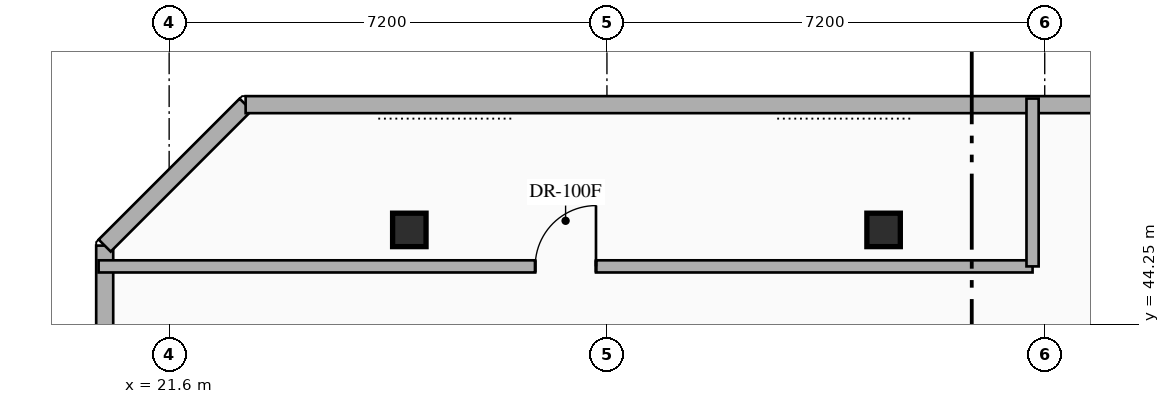
"""IFC4 building model, lengths in metres.
Left out: names, types, materials, properties, quantities, classifications, styles, units other than length and angle.
Written with IfcOpenShell. Run it as: python <this file> out.ifc"""

import sys

from ifc_helpers import new_model, si_unit, direction, frame, frame_2d, origin, origin_2d, place, context, subcontext, project, spatial, rectangle, hollow_rectangle, extrude, element, fill, save


model = new_model("IFC4")
c1 = context("Model", 3, precision=1e-05, world=origin(), true_north=direction((0.0, 1.0)))
c2 = subcontext(c1, "Body", "Model", "MODEL_VIEW")
j1 = project(units=[si_unit("LENGTHUNIT", "METRE"), si_unit("PLANEANGLEUNIT", "RADIAN")], contexts=[c1])
p1 = place(None, origin())
s1 = spatial("IfcSite", under=j1, at=p1, CompositionType="ELEMENT")
p2 = place(p1, origin())
s2 = spatial("IfcBuilding", under=s1, at=p2, CompositionType="ELEMENT")
p3 = place(p2, frame((0.0, 0.0, 289.95)))
s3 = spatial("IfcBuildingStorey", under=s2, at=p3, CompositionType="ELEMENT", Elevation=289.95)
for number, where, z_axis, x_axis in (
    (1, (25.55, 45.8, 0.0), (0.0, 0.0, 1.0), (1.0, 0.0, 0.0)),
    (2, (33.35, 45.8, 0.0), (0.0, 0.0, 1.0), (1.0, 0.0, 0.0)),
):
    element("IfcColumn", number, at=place(p3, frame(where, z_axis=z_axis, x_axis=x_axis)), inside=s3, PredefinedType="COLUMN", context=c2, shape_type="SweptSolid", body=[
        extrude(hollow_rectangle(XDim=0.55, YDim=0.55, WallThickness=0.022, at=origin_2d()), origin(), (0.0, 0.0, 1.0), 3.818),
    ])
p4 = place(p3, frame((20.54, 23.54, 0.0), z_axis=(0.0, 0.0, 1.0), x_axis=(0.0, 1.0, 0.0)))
e3 = element("IfcWall", 3, at=p4, inside=s3, PredefinedType="STANDARD", context=c2, shape_type="SweptSolid", body=[
    extrude(rectangle(XDim=22.002, YDim=0.28, at=frame_2d((11.001, 0.0))), origin(), (0.0, 0.0, 1.0), 3.85),
])
p5 = place(p3, frame((20.54, 45.542, 0.0), z_axis=(0.0, 0.0, 1.0), x_axis=(0.707069542501, 0.707144017911, 0.0)))
e4 = element("IfcWall", 4, at=p5, inside=s3, PredefinedType="STANDARD", context=c2, shape_type="SweptSolid", body=[
    extrude(rectangle(XDim=3.278, YDim=0.28, at=frame_2d((1.639, 0.0))), origin(), (0.0, 0.0, 1.0), 3.85),
])
p6 = place(p3, frame((22.858, 47.86, 0.0), z_axis=(0.0, 0.0, 1.0), x_axis=(1.0, 0.0, 0.0)))
e5 = element("IfcWall", 5, at=p6, inside=s3, PredefinedType="STANDARD", context=c2, shape_type="SweptSolid", body=[
    extrude(rectangle(XDim=19.684, YDim=0.28, at=frame_2d((9.842, 0.0))), origin(), (0.0, 0.0, 1.0), 3.85),
])
p7 = place(p3, frame((20.44, 45.2, 0.0), z_axis=(0.0, 0.0, 1.0), x_axis=(1.0, 0.0, 0.0)))
e6 = element("IfcWall", 6, at=p7, inside=s3, PredefinedType="STANDARD", context=c2, shape_type="SweptSolid", body=[
    extrude(rectangle(XDim=15.36, YDim=0.2, at=frame_2d((7.68, 0.0))), origin(), (0.0, 0.0, 1.0), 3.85),
])
p8 = place(p7, frame((7.18, 0.0, 0.0)))
e7 = element("IfcOpeningElement", 7, at=p8, cuts=e6, PredefinedType="OPENING", context=c2, shape_type="SweptSolid", body=[
    extrude(rectangle(XDim=1.0, YDim=2.2, at=frame_2d((0.5, 1.1))), frame((0.0, 0.11, 0.0), z_axis=(0.0, -1.0, 0.0), x_axis=(1.0, 0.0, 0.0)), (0.0, 0.0, 1.0), 0.22),
])
p9 = place(p3, frame((35.8, 45.2, 0.0), z_axis=(0.0, 0.0, 1.0), x_axis=(0.0, 1.0, 0.0)))
e8 = element("IfcWall", 8, at=p9, inside=s3, PredefinedType="STANDARD", context=c2, shape_type="SweptSolid", body=[
    extrude(rectangle(XDim=2.76, YDim=0.2, at=frame_2d((1.38, 0.0))), origin(), (0.0, 0.0, 1.0), 3.85),
])
p10 = place(p8, origin())
e9 = element("IfcDoor", 9, at=p10, inside=s3, OperationType="SINGLE_SWING_RIGHT", PredefinedType="DOOR", context=c2, shape_type="SweptSolid", body=[
    extrude(rectangle(XDim=1.0, YDim=2.2, at=frame_2d((0.5, 1.1))), frame((0.0, 0.025, 0.0), z_axis=(0.0, -1.0, 0.0), x_axis=(1.0, 0.0, 0.0)), (0.0, 0.0, 1.0), 0.05),
])
fill(e7, e9)
save(model, sys.argv[1])
